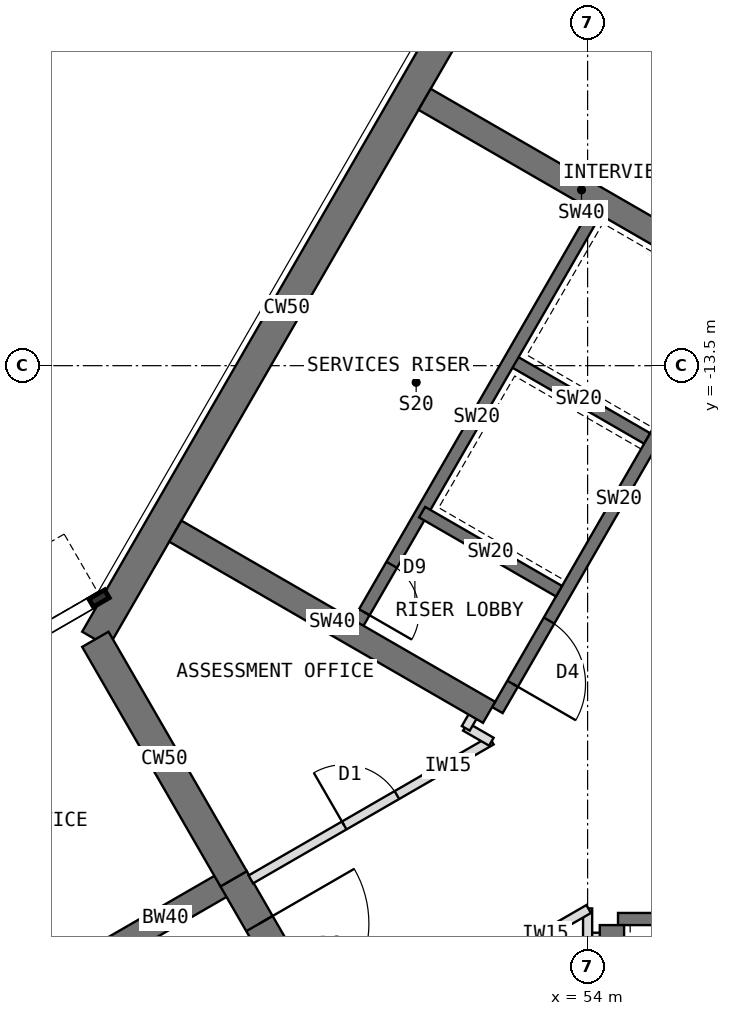
"""IFC4 building model, lengths in metres.
Left out: names, types, materials, properties, quantities, classifications, styles, units other than length and angle.
Written with IfcOpenShell. Run it as: python <this file> out.ifc"""

import sys

from ifc_helpers import new_model, si_unit, direction, frame, frame_2d, origin, place, context, subcontext, project, spatial, rectangle, extrude, element, fill, save


model = new_model("IFC4")
c1 = context("Model", 3, precision=1e-05, world=origin(), true_north=direction((0.0, 1.0)))
c2 = subcontext(c1, "Body", "Model", "MODEL_VIEW")
j1 = project(units=[si_unit("LENGTHUNIT", "METRE"), si_unit("PLANEANGLEUNIT", "RADIAN")], contexts=[c1])
p1 = place(None, origin())
s1 = spatial("IfcSite", under=j1, at=p1, CompositionType="ELEMENT")
p2 = place(p1, origin())
s2 = spatial("IfcBuilding", under=s1, at=p2, CompositionType="ELEMENT")
p3 = place(p2, frame((0.0, 0.0, 194.5)))
s3 = spatial("IfcBuildingStorey", under=s2, at=p3, CompositionType="ELEMENT", Elevation=194.5)
p4 = place(p3, frame((52.202, -7.092, 0.0), z_axis=(0.0, 0.0, 1.0), x_axis=(-0.500005998175, -0.866021940709, 0.0)))
e1 = element("IfcWall", 1, at=p4, inside=s3, PredefinedType="SHEAR", context=c2, shape_type="SweptSolid", body=[
    extrude(rectangle(XDim=12.596, YDim=0.5, at=frame_2d((6.298, 0.0))), origin(), (0.0, 0.0, 1.0), 4.0),
])
p5 = place(p3, frame((45.904, -18.0, 0.0), z_axis=(0.0, 0.0, 1.0), x_axis=(0.500024481964, -0.866011268655, 0.0)))
e2 = element("IfcWall", 2, at=p5, inside=s3, PredefinedType="SHEAR", context=c2, shape_type="SweptSolid", body=[
    extrude(rectangle(XDim=4.548, YDim=0.5, at=frame_2d((2.274, 0.0))), origin(), (0.0, 0.0, 1.0), 4.0),
])
p6 = place(p3, frame((48.178, -21.939, 0.0), z_axis=(0.0, 0.0, 1.0), x_axis=(0.500010275428, -0.866019471182, 0.0)))
e3 = element("IfcWall", 3, at=p6, inside=s3, PredefinedType="SHEAR", context=c2, shape_type="SweptSolid", body=[
    extrude(rectangle(XDim=3.5, YDim=0.5, at=frame_2d((1.75, 0.0))), origin(), (0.0, 0.0, 1.0), 4.0),
])
p7 = place(p6, frame((0.85, 0.0, 0.0)))
e4 = element("IfcOpeningElement", 4, at=p7, cuts=e3, PredefinedType="OPENING", context=c2, shape_type="SweptSolid", body=[
    extrude(rectangle(XDim=1.8, YDim=2.1, at=frame_2d((0.9, 1.05))), frame((0.0, 0.26, 0.0), z_axis=(0.0, -1.0, 0.0), x_axis=(1.0, 0.0, 0.0)), (0.0, 0.0, 1.0), 0.52),
])
p8 = place(p3, frame((48.178, -21.939, 0.0), z_axis=(0.0, 0.0, 1.0), x_axis=(-0.866072649678, -0.499918158782, 0.0)))
e5 = element("IfcWall", 5, at=p8, inside=s3, PredefinedType="SHEAR", context=c2, shape_type="SweptSolid", body=[
    extrude(rectangle(XDim=2.592, YDim=0.4, at=frame_2d((1.296, 0.0))), origin(), (0.0, 0.0, 1.0), 4.0),
])
p9 = place(p3, frame((56.516, -12.236, 0.0), z_axis=(0.0, 0.0, 1.0), x_axis=(-0.49999894854, -0.866026010844, 0.0)))
e6 = element("IfcWall", 6, at=p9, inside=s3, PredefinedType="SHEAR", context=c2, shape_type="SweptSolid", body=[
    extrude(rectangle(XDim=8.0, YDim=0.2, at=frame_2d((4.0, 0.0))), origin(), (0.0, 0.0, 1.0), 4.0),
])
p10 = place(p9, frame((6.3, 0.0, 0.0)))
e7 = element("IfcOpeningElement", 7, at=p10, cuts=e6, PredefinedType="OPENING", context=c2, shape_type="SweptSolid", body=[
    extrude(rectangle(XDim=1.2, YDim=2.1, at=frame_2d((0.6, 1.05))), frame((0.0, 0.11, 0.0), z_axis=(0.0, -1.0, 0.0), x_axis=(1.0, 0.0, 0.0)), (0.0, 0.0, 1.0), 0.22),
])
for number, where, z_axis, x_axis in (
    (8, (54.98, -14.697, 0.0), (0.0, 0.0, 1.0), (-0.866, 0.5, 0.0)),
    (9, (53.53, -17.209, 0.0), (0.0, 0.0, 1.0), (-0.866, 0.5, 0.0)),
):
    element("IfcWall", number, at=place(p3, frame(where, z_axis=z_axis, x_axis=x_axis)), inside=s3, PredefinedType="SHEAR", context=c2, shape_type="SweptSolid", body=[
        extrude(rectangle(XDim=2.6, YDim=0.2, at=frame_2d((1.3, 0.0))), origin(), (0.0, 0.0, 1.0), 4.0),
    ])
p11 = place(p3, frame((54.178, -10.886, 0.0), z_axis=(0.0, 0.0, 1.0), x_axis=(-0.49999894854, -0.866026010844, 0.0)))
e10 = element("IfcWall", 10, at=p11, inside=s3, PredefinedType="SHEAR", context=c2, shape_type="SweptSolid", body=[
    extrude(rectangle(XDim=8.0, YDim=0.2, at=frame_2d((4.0, 0.0))), origin(), (0.0, 0.0, 1.0), 4.0),
])
p12 = place(p11, frame((6.8, 0.0, 0.0)))
e11 = element("IfcOpeningElement", 11, at=p12, cuts=e10, PredefinedType="OPENING", context=c2, shape_type="SweptSolid", body=[
    extrude(rectangle(XDim=0.9, YDim=2.1, at=frame_2d((0.45, 1.05))), frame((0.0, 0.11, 0.0), z_axis=(0.0, -1.0, 0.0), x_axis=(1.0, 0.0, 0.0)), (0.0, 0.0, 1.0), 0.22),
])
p13 = place(p3, frame((52.38, -19.201, 0.0), z_axis=(0.0, 0.0, 1.0), x_axis=(-0.866012946976, 0.500021575205, 0.0)))
e12 = element("IfcWall", 12, at=p13, inside=s3, PredefinedType="SHEAR", context=c2, shape_type="SweptSolid", body=[
    extrude(rectangle(XDim=5.958, YDim=0.4, at=frame_2d((2.979, 0.0))), origin(), (0.0, 0.0, 1.0), 4.0),
])
p14 = place(p3, frame((56.48, -12.099, 0.0), z_axis=(0.0, 0.0, 1.0), x_axis=(-0.86602319114, 0.500003832394, 0.0)))
e13 = element("IfcWall", 13, at=p14, inside=s3, PredefinedType="SHEAR", context=c2, shape_type="SweptSolid", body=[
    extrude(rectangle(XDim=5.958, YDim=0.4, at=frame_2d((2.979, 0.0))), origin(), (0.0, 0.0, 1.0), 4.0),
])
p15 = place(p3, frame((54.5, -22.6, 0.0), z_axis=(0.0, 0.0, 1.0), x_axis=(1.0, 0.0, 0.0)))
e14 = element("IfcWall", 14, at=p15, inside=s3, PredefinedType="SHEAR", context=c2, shape_type="SweptSolid", body=[
    extrude(rectangle(XDim=8.0, YDim=0.2, at=frame_2d((4.0, 0.0))), origin(), (0.0, 0.0, 1.0), 4.0),
])
p16 = place(p15, frame((6.3, 0.0, 0.0)))
e15 = element("IfcOpeningElement", 15, at=p16, cuts=e14, PredefinedType="OPENING", context=c2, shape_type="SweptSolid", body=[
    extrude(rectangle(XDim=1.2, YDim=2.1, at=frame_2d((0.6, 1.05))), frame((0.0, 0.11, 0.0), z_axis=(0.0, -1.0, 0.0), x_axis=(1.0, 0.0, 0.0)), (0.0, 0.0, 1.0), 0.22),
])
p17 = place(p15, frame((0.9, 0.0, 0.0)))
e16 = element("IfcOpeningElement", 16, at=p17, cuts=e14, PredefinedType="OPENING", context=c2, shape_type="SweptSolid", body=[
    extrude(rectangle(XDim=1.1, YDim=2.2, at=frame_2d((0.55, 1.1))), frame((0.0, 0.11, 0.0), z_axis=(0.0, -1.0, 0.0), x_axis=(1.0, 0.0, 0.0)), (0.0, 0.0, 1.0), 0.22),
])
p18 = place(p3, frame((54.4, -22.7, 0.0), z_axis=(0.0, 0.0, 1.0), x_axis=(0.0, -1.0, 0.0)))
e17 = element("IfcWall", 17, at=p18, inside=s3, PredefinedType="SHEAR", context=c2, shape_type="SweptSolid", body=[
    extrude(rectangle(XDim=5.958, YDim=0.4, at=frame_2d((2.979, 0.0))), origin(), (0.0, 0.0, 1.0), 4.0),
])
p19 = place(p3, frame((54.41, -22.9, 0.0), z_axis=(0.0, 0.0, 1.0), x_axis=(-1.0, 0.0, 0.0)))
e18 = element("IfcWall", 18, at=p19, inside=s3, PredefinedType="PARTITIONING", context=c2, shape_type="SweptSolid", body=[
    extrude(rectangle(XDim=0.43, YDim=0.15, at=frame_2d((0.215, 0.0))), origin(), (0.0, 0.0, 1.0), 3.8),
])
p20 = place(p3, frame((54.0, -22.92, 0.0), z_axis=(0.0, 0.0, 1.0), x_axis=(0.0, 1.0, 0.0)))
e19 = element("IfcWall", 19, at=p20, inside=s3, PredefinedType="PARTITIONING", context=c2, shape_type="SweptSolid", body=[
    extrude(rectangle(XDim=0.494, YDim=0.15, at=frame_2d((0.247, 0.0))), origin(), (0.0, 0.0, 1.0), 3.8),
])
p21 = place(p3, frame((54.017, -22.436, 0.0), z_axis=(0.0, 0.0, 1.0), x_axis=(-0.866024503882, -0.500001558674, 0.0)))
e20 = element("IfcWall", 20, at=p21, inside=s3, PredefinedType="PARTITIONING", context=c2, shape_type="SweptSolid", body=[
    extrude(rectangle(XDim=4.568, YDim=0.15, at=frame_2d((2.284, 0.0))), origin(), (0.0, 0.0, 1.0), 3.8),
])
p22 = place(p21, frame((1.794, 0.0, 0.0)))
e21 = element("IfcOpeningElement", 21, at=p22, cuts=e20, PredefinedType="OPENING", context=c2, shape_type="SweptSolid", body=[
    extrude(rectangle(XDim=1.0, YDim=2.1, at=frame_2d((0.5, 1.05))), frame((0.0, 0.085, 0.0), z_axis=(0.0, -1.0, 0.0), x_axis=(1.0, 0.0, 0.0)), (0.0, 0.0, 1.0), 0.17),
])
p23 = place(p3, frame((48.461, -21.948, 0.0), z_axis=(0.0, 0.0, 1.0), x_axis=(0.866024503882, 0.500001558674, 0.0)))
e22 = element("IfcWall", 22, at=p23, inside=s3, PredefinedType="PARTITIONING", context=c2, shape_type="SweptSolid", body=[
    extrude(rectangle(XDim=4.568, YDim=0.15, at=frame_2d((2.284, 0.0))), origin(), (0.0, 0.0, 1.0), 3.8),
])
p24 = place(p23, frame((1.774, 0.0, 0.0)))
e23 = element("IfcOpeningElement", 23, at=p24, cuts=e22, PredefinedType="OPENING", context=c2, shape_type="SweptSolid", body=[
    extrude(rectangle(XDim=1.0, YDim=2.1, at=frame_2d((0.5, 1.05))), frame((0.0, 0.085, 0.0), z_axis=(0.0, -1.0, 0.0), x_axis=(1.0, 0.0, 0.0)), (0.0, 0.0, 1.0), 0.17),
])
p25 = place(p3, frame((52.417, -19.684, 0.0), z_axis=(0.0, 0.0, 1.0), x_axis=(-0.865831790172, 0.50033519877, 0.0)))
e24 = element("IfcWall", 24, at=p25, inside=s3, PredefinedType="PARTITIONING", context=c2, shape_type="SweptSolid", body=[
    extrude(rectangle(XDim=0.494, YDim=0.15, at=frame_2d((0.247, 0.0))), origin(), (0.0, 0.0, 1.0), 3.8),
])
p26 = place(p3, frame((51.997, -19.464, 0.0), z_axis=(0.0, 0.0, 1.0), x_axis=(0.499804398801, 0.866138304741, 0.0)))
e25 = element("IfcWall", 25, at=p26, inside=s3, PredefinedType="PARTITIONING", context=c2, shape_type="SweptSolid", body=[
    extrude(rectangle(XDim=0.43, YDim=0.15, at=frame_2d((0.215, 0.0))), origin(), (0.0, 0.0, 1.0), 3.8),
])
p27 = place(p10, origin())
e26 = element("IfcDoor", 26, at=p27, inside=s3, OperationType="SINGLE_SWING_RIGHT", PredefinedType="DOOR", context=c2, shape_type="SweptSolid", body=[
    extrude(rectangle(XDim=1.2, YDim=2.1, at=frame_2d((0.6, 1.05))), frame((0.0, 0.025, 0.0), z_axis=(0.0, -1.0, 0.0), x_axis=(1.0, 0.0, 0.0)), (0.0, 0.0, 1.0), 0.05),
])
fill(e7, e26)
p28 = place(p12, origin())
e27 = element("IfcDoor", 27, at=p28, inside=s3, OperationType="SINGLE_SWING_RIGHT", PredefinedType="DOOR", context=c2, shape_type="SweptSolid", body=[
    extrude(rectangle(XDim=0.9, YDim=2.1, at=frame_2d((0.45, 1.05))), frame((0.0, 0.025, 0.0), z_axis=(0.0, -1.0, 0.0), x_axis=(1.0, 0.0, 0.0)), (0.0, 0.0, 1.0), 0.05),
])
fill(e11, e27)
p29 = place(p7, origin())
e28 = element("IfcDoor", 28, at=p29, inside=s3, OperationType="DOUBLE_DOOR_DOUBLE_SWING", PredefinedType="DOOR", context=c2, shape_type="SweptSolid", body=[
    extrude(rectangle(XDim=1.8, YDim=2.1, at=frame_2d((0.9, 1.05))), frame((0.0, 0.025, 0.0), z_axis=(0.0, -1.0, 0.0), x_axis=(1.0, 0.0, 0.0)), (0.0, 0.0, 1.0), 0.05),
])
fill(e4, e28)
p30 = place(p24, origin())
e29 = element("IfcDoor", 29, at=p30, inside=s3, OperationType="SINGLE_SWING_LEFT", PredefinedType="DOOR", context=c2, shape_type="SweptSolid", body=[
    extrude(rectangle(XDim=1.0, YDim=2.1, at=frame_2d((0.5, 1.05))), frame((0.0, 0.025, 0.0), z_axis=(0.0, -1.0, 0.0), x_axis=(1.0, 0.0, 0.0)), (0.0, 0.0, 1.0), 0.05),
])
fill(e23, e29)
save(model, sys.argv[1])
